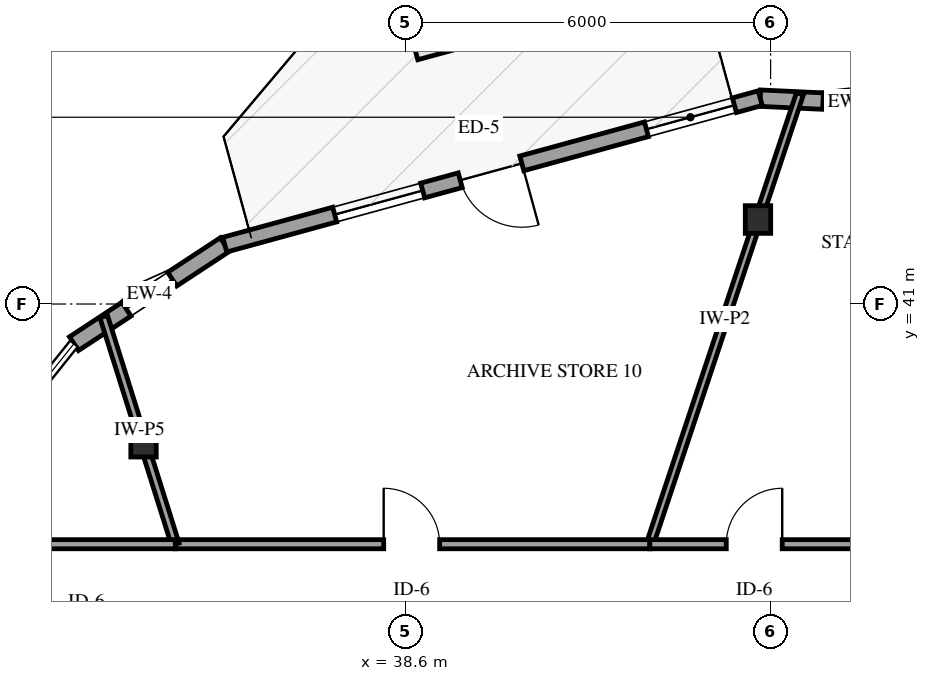
"""IFC4 building model, lengths in metres.
Left out: names, types, materials, properties, quantities, classifications, styles, units other than length and angle.
Written with IfcOpenShell. Run it as: python <this file> out.ifc"""

import sys

from ifc_helpers import new_model, si_unit, direction, frame, frame_2d, origin, origin_2d, place, context, subcontext, project, spatial, rectangle, i_section, extrude, element, fill, save


model = new_model("IFC4")
c1 = context("Model", 3, precision=1e-05, world=origin(), true_north=direction((0.0, 1.0)))
c2 = subcontext(c1, "Body", "Model", "MODEL_VIEW")
j1 = project(units=[si_unit("LENGTHUNIT", "METRE"), si_unit("PLANEANGLEUNIT", "RADIAN")], contexts=[c1])
p1 = place(None, origin())
s1 = spatial("IfcSite", under=j1, at=p1, CompositionType="ELEMENT")
p2 = place(p1, origin())
s2 = spatial("IfcBuilding", under=s1, at=p2, CompositionType="ELEMENT")
p3 = place(p2, frame((0.0, 0.0, 87.4)))
s3 = spatial("IfcBuildingStorey", under=s2, at=p3, CompositionType="ELEMENT", Elevation=87.4)
for number, where, z_axis, x_axis in (
    (1, (44.393, 42.389, -0.3), (0.0, 0.0, 1.0), (1.0, 0.0, 0.0)),
    (2, (34.288, 38.711, -0.3), (0.0, 0.0, 1.0), (1.0, 0.0, 0.0)),
):
    element("IfcColumn", number, at=place(p3, frame(where, z_axis=z_axis, x_axis=x_axis)), inside=s3, PredefinedType="COLUMN", context=c2, shape_type="SweptSolid", body=[
        extrude(i_section(OverallWidth=0.418, OverallDepth=0.455, WebThickness=0.042, FlangeThickness=0.068, FilletRadius=0.038, at=origin_2d()), origin(), (0.0, 0.0, 1.0), 4.2),
    ])
p4 = place(p3, frame((47.393, 44.246, 0.0), z_axis=(0.0, 0.0, 1.0), x_axis=(-0.998887602896, 0.04715460508, 0.0)))
e3 = element("IfcWall", 3, at=p4, inside=s3, PredefinedType="SOLIDWALL", context=c2, shape_type="SweptSolid", body=[
    extrude(rectangle(XDim=2.967, YDim=0.27, at=frame_2d((1.483, 0.0))), origin(), (0.0, 0.0, 1.0), 2.979),
])
p5 = place(p4, frame((1.033, 0.0, 0.75)))
e4 = element("IfcOpeningElement", 4, at=p5, cuts=e3, PredefinedType="OPENING", context=c2, shape_type="SweptSolid", body=[
    extrude(rectangle(XDim=0.9, YDim=1.5, at=frame_2d((0.45, 0.75))), frame((0.0, 0.145, 0.0), z_axis=(0.0, -1.0, 0.0), x_axis=(1.0, 0.0, 0.0)), (0.0, 0.0, 1.0), 0.29),
])
p6 = place(p3, frame((35.623, 41.976, 0.0), z_axis=(0.0, 0.0, 1.0), x_axis=(-0.835816616247, -0.549008728533, 0.0)))
e5 = element("IfcWall", 5, at=p6, inside=s3, PredefinedType="SOLIDWALL", context=c2, shape_type="SweptSolid", body=[
    extrude(rectangle(XDim=2.967, YDim=0.27, at=frame_2d((1.483, 0.0))), origin(), (0.0, 0.0, 1.0), 2.979),
])
p7 = place(p6, frame((1.033, 0.0, 0.75)))
e6 = element("IfcOpeningElement", 6, at=p7, cuts=e5, PredefinedType="OPENING", context=c2, shape_type="SweptSolid", body=[
    extrude(rectangle(XDim=0.9, YDim=1.5, at=frame_2d((0.45, 0.75))), frame((0.0, 0.145, 0.0), z_axis=(0.0, -1.0, 0.0), x_axis=(1.0, 0.0, 0.0)), (0.0, 0.0, 1.0), 0.29),
])
p8 = place(p3, frame((44.429, 44.385, 0.0), z_axis=(0.0, 0.0, 1.0), x_axis=(-0.964553074607, -0.263888927894, 0.0)))
e7 = element("IfcWall", 7, at=p8, inside=s3, PredefinedType="SOLIDWALL", context=c2, shape_type="SweptSolid", body=[
    extrude(rectangle(XDim=9.13, YDim=0.25, at=frame_2d((4.565, 0.0))), origin(), (0.0, 0.0, 1.0), 2.979),
])
p9 = place(p8, frame((4.065, 0.0, 0.0)))
e8 = element("IfcOpeningElement", 8, at=p9, cuts=e7, PredefinedType="OPENING", context=c2, shape_type="SweptSolid", body=[
    extrude(rectangle(XDim=1.05, YDim=2.15, at=frame_2d((0.525, 1.075))), frame((0.0, 0.135, 0.0), z_axis=(0.0, -1.0, 0.0), x_axis=(1.0, 0.0, 0.0)), (0.0, 0.0, 1.0), 0.27),
])
p10 = place(p8, frame((0.44, 0.0, 0.72)))
e9 = element("IfcOpeningElement", 9, at=p10, cuts=e7, PredefinedType="OPENING", context=c2, shape_type="SweptSolid", body=[
    extrude(rectangle(XDim=1.5, YDim=1.7, at=frame_2d((0.75, 0.85))), frame((0.0, 0.135, 0.0), z_axis=(0.0, -1.0, 0.0), x_axis=(1.0, 0.0, 0.0)), (0.0, 0.0, 1.0), 0.27),
])
p11 = place(p8, frame((5.755, 0.0, 0.72)))
e10 = element("IfcOpeningElement", 10, at=p11, cuts=e7, PredefinedType="OPENING", context=c2, shape_type="SweptSolid", body=[
    extrude(rectangle(XDim=1.5, YDim=1.7, at=frame_2d((0.75, 0.85))), frame((0.0, 0.135, 0.0), z_axis=(0.0, -1.0, 0.0), x_axis=(1.0, 0.0, 0.0)), (0.0, 0.0, 1.0), 0.27),
])
p12 = place(p3, frame((42.614, 37.05, 0.0), z_axis=(0.0, 0.0, 1.0), x_axis=(0.316115189383, 0.948720816174, 0.0)))
e11 = element("IfcWall", 11, at=p12, inside=s3, PredefinedType="PARTITIONING", context=c2, shape_type="SweptSolid", body=[
    extrude(rectangle(XDim=7.807, YDim=0.12, at=frame_2d((3.904, 0.0))), origin(), (0.0, 0.0, 1.0), 2.895),
])
p13 = place(p3, frame((34.81, 37.05, 0.0), z_axis=(0.0, 0.0, 1.0), x_axis=(1.0, 0.0, 0.0)))
e12 = element("IfcWall", 12, at=p13, inside=s3, PredefinedType="PARTITIONING", context=c2, shape_type="SweptSolid", body=[
    extrude(rectangle(XDim=7.804, YDim=0.15, at=frame_2d((3.902, 0.0))), origin(), (0.0, 0.0, 1.0), 3.6),
])
p14 = place(p13, frame((3.427, 0.0, 0.0)))
e13 = element("IfcOpeningElement", 13, at=p14, cuts=e12, PredefinedType="OPENING", context=c2, shape_type="SweptSolid", body=[
    extrude(rectangle(XDim=0.92, YDim=2.12, at=frame_2d((0.46, 1.06))), frame((0.0, 0.085, 0.0), z_axis=(0.0, -1.0, 0.0), x_axis=(1.0, 0.0, 0.0)), (0.0, 0.0, 1.0), 0.17),
])
p15 = place(p3, frame((34.81, 37.05, 0.0), z_axis=(0.0, 0.0, 1.0), x_axis=(-0.300049924384, 0.953923499489, 0.0)))
e14 = element("IfcWall", 14, at=p15, inside=s3, PredefinedType="PARTITIONING", context=c2, shape_type="SweptSolid", body=[
    extrude(rectangle(XDim=3.923, YDim=0.13, at=frame_2d((1.961, 0.0))), origin(), (0.0, 0.0, 1.0), 2.895),
])
p16 = place(p3, frame((42.614, 37.05, 0.0), z_axis=(0.0, 0.0, 1.0), x_axis=(1.0, 0.0, 0.0)))
e15 = element("IfcWall", 15, at=p16, inside=s3, PredefinedType="PARTITIONING", context=c2, shape_type="SweptSolid", body=[
    extrude(rectangle(XDim=3.463, YDim=0.15, at=frame_2d((1.731, 0.0))), origin(), (0.0, 0.0, 1.0), 3.6),
])
p17 = place(p16, frame((1.257, 0.0, 0.0)))
e16 = element("IfcOpeningElement", 16, at=p17, cuts=e15, PredefinedType="OPENING", context=c2, shape_type="SweptSolid", body=[
    extrude(rectangle(XDim=0.92, YDim=2.12, at=frame_2d((0.46, 1.06))), frame((0.0, 0.085, 0.0), z_axis=(0.0, -1.0, 0.0), x_axis=(1.0, 0.0, 0.0)), (0.0, 0.0, 1.0), 0.17),
])
p18 = place(p3, frame((32.67, 37.05, 0.0), z_axis=(0.0, 0.0, 1.0), x_axis=(1.0, 0.0, 0.0)))
e17 = element("IfcWall", 17, at=p18, inside=s3, PredefinedType="PARTITIONING", context=c2, shape_type="SweptSolid", body=[
    extrude(rectangle(XDim=2.14, YDim=0.15, at=frame_2d((1.07, 0.0))), origin(), (0.0, 0.0, 1.0), 3.6),
])
p19 = place(p5, origin())
e18 = element("IfcWindow", 18, at=p19, inside=s3, PartitioningType="SINGLE_PANEL", PredefinedType="WINDOW", context=c2, shape_type="SweptSolid", body=[
    extrude(rectangle(XDim=0.9, YDim=1.5, at=frame_2d((0.45, 0.75))), frame((0.0, 0.03, 0.0), z_axis=(0.0, -1.0, 0.0), x_axis=(1.0, 0.0, 0.0)), (0.0, 0.0, 1.0), 0.06),
])
fill(e4, e18)
p20 = place(p7, origin())
e19 = element("IfcWindow", 19, at=p20, inside=s3, PartitioningType="SINGLE_PANEL", PredefinedType="WINDOW", context=c2, shape_type="SweptSolid", body=[
    extrude(rectangle(XDim=0.9, YDim=1.5, at=frame_2d((0.45, 0.75))), frame((0.0, 0.03, 0.0), z_axis=(0.0, -1.0, 0.0), x_axis=(1.0, 0.0, 0.0)), (0.0, 0.0, 1.0), 0.06),
])
fill(e6, e19)
p21 = place(p9, origin())
e20 = element("IfcDoor", 20, at=p21, inside=s3, OperationType="SINGLE_SWING_LEFT", PredefinedType="DOOR", context=c2, shape_type="SweptSolid", body=[
    extrude(rectangle(XDim=1.05, YDim=2.15, at=frame_2d((0.525, 1.075))), frame((0.0, 0.025, 0.0), z_axis=(0.0, -1.0, 0.0), x_axis=(1.0, 0.0, 0.0)), (0.0, 0.0, 1.0), 0.05),
])
fill(e8, e20)
p22 = place(p10, origin())
e21 = element("IfcWindow", 21, at=p22, inside=s3, PartitioningType="SINGLE_PANEL", PredefinedType="WINDOW", context=c2, shape_type="SweptSolid", body=[
    extrude(rectangle(XDim=1.5, YDim=1.7, at=frame_2d((0.75, 0.85))), frame((0.0, 0.03, 0.0), z_axis=(0.0, -1.0, 0.0), x_axis=(1.0, 0.0, 0.0)), (0.0, 0.0, 1.0), 0.06),
])
fill(e9, e21)
p23 = place(p11, origin())
e22 = element("IfcWindow", 22, at=p23, inside=s3, PartitioningType="SINGLE_PANEL", PredefinedType="WINDOW", context=c2, shape_type="SweptSolid", body=[
    extrude(rectangle(XDim=1.5, YDim=1.7, at=frame_2d((0.75, 0.85))), frame((0.0, 0.03, 0.0), z_axis=(0.0, -1.0, 0.0), x_axis=(1.0, 0.0, 0.0)), (0.0, 0.0, 1.0), 0.06),
])
fill(e10, e22)
p24 = place(p14, origin())
e23 = element("IfcDoor", 23, at=p24, inside=s3, OperationType="SINGLE_SWING_LEFT", PredefinedType="DOOR", context=c2, shape_type="SweptSolid", body=[
    extrude(rectangle(XDim=0.92, YDim=2.12, at=frame_2d((0.46, 1.06))), frame((0.0, 0.025, 0.0), z_axis=(0.0, -1.0, 0.0), x_axis=(1.0, 0.0, 0.0)), (0.0, 0.0, 1.0), 0.05),
])
fill(e13, e23)
p25 = place(p17, origin())
e24 = element("IfcDoor", 24, at=p25, inside=s3, OperationType="SINGLE_SWING_RIGHT", PredefinedType="DOOR", context=c2, shape_type="SweptSolid", body=[
    extrude(rectangle(XDim=0.92, YDim=2.12, at=frame_2d((0.46, 1.06))), frame((0.0, 0.025, 0.0), z_axis=(0.0, -1.0, 0.0), x_axis=(1.0, 0.0, 0.0)), (0.0, 0.0, 1.0), 0.05),
])
fill(e16, e24)
save(model, sys.argv[1])
